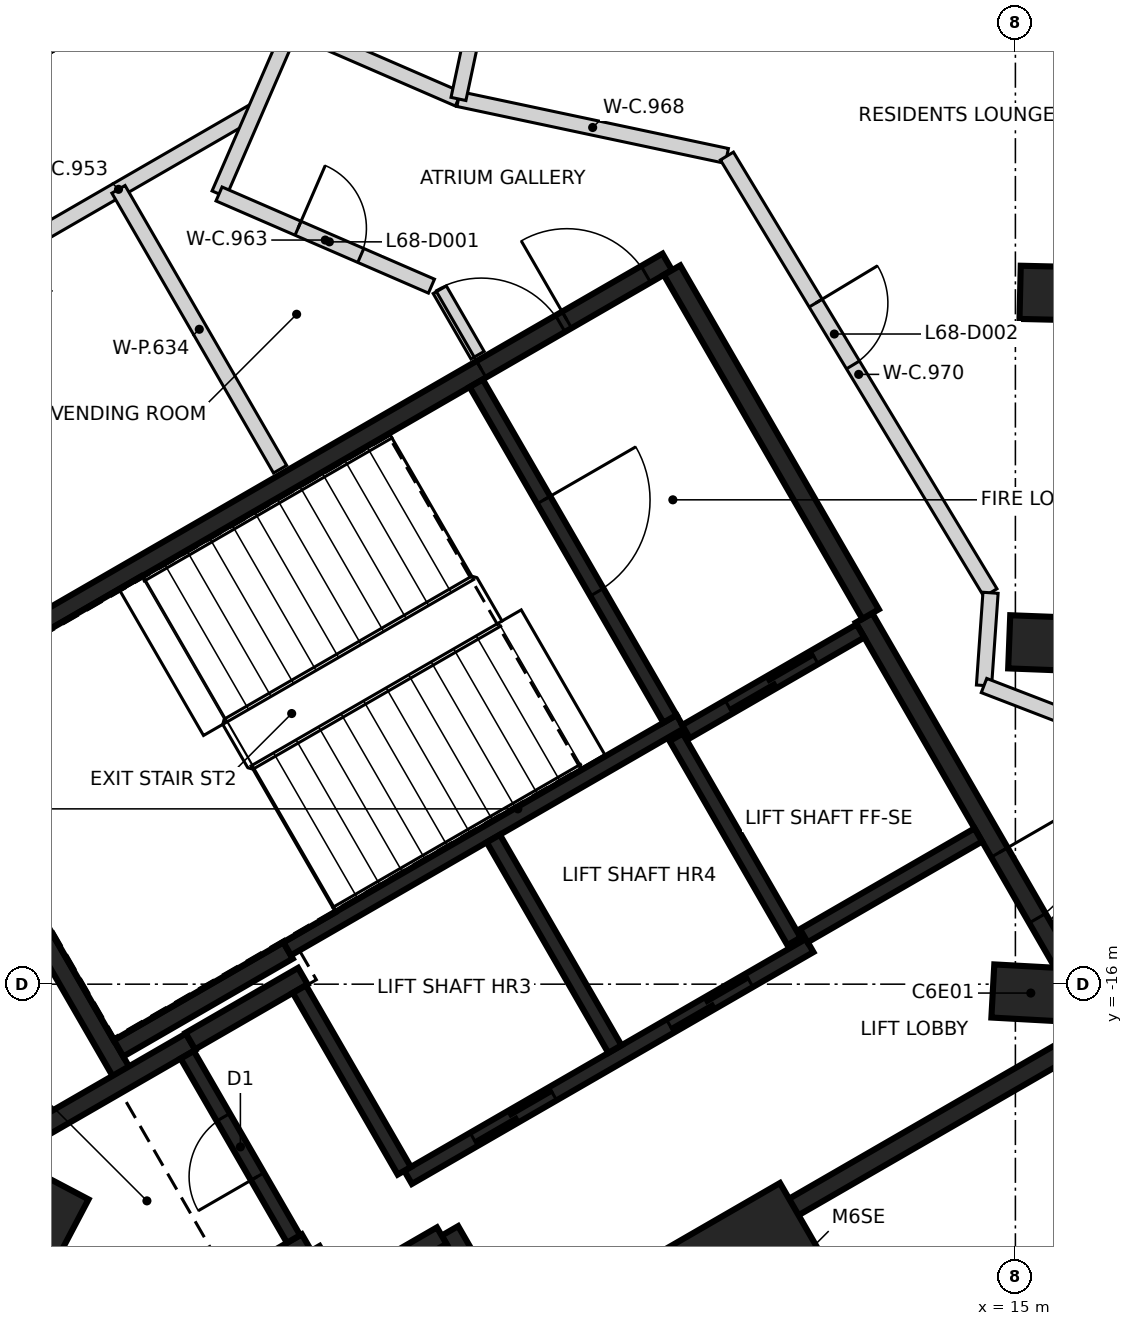
"""IFC4 building model, lengths in metres.
Left out: names, types, materials, properties, quantities, classifications, styles, units other than length and angle.
Written with IfcOpenShell. Run it as: python <this file> out.ifc"""

import sys

from ifc_helpers import new_model, si_unit, direction, frame, frame_2d, origin, origin_2d, place, context, subcontext, project, spatial, rectangle, extrude, element, fill, save


model = new_model("IFC4")
c1 = context("Model", 3, precision=1e-05, world=origin(), true_north=direction((0.0, 1.0)))
c2 = subcontext(c1, "Body", "Model", "MODEL_VIEW")
j1 = project(units=[si_unit("LENGTHUNIT", "METRE"), si_unit("PLANEANGLEUNIT", "RADIAN")], contexts=[c1])
p1 = place(None, origin())
s1 = spatial("IfcSite", under=j1, at=p1, CompositionType="ELEMENT")
p2 = place(p1, origin())
s2 = spatial("IfcBuilding", under=s1, at=p2, CompositionType="ELEMENT")
p3 = place(p2, frame((0.0, 0.0, 269.4)))
s3 = spatial("IfcBuildingStorey", under=s2, at=p3, CompositionType="ELEMENT", Elevation=269.4)
for number, where, z_axis, x_axis in (
    (1, (15.202, -16.117, -0.35), (0.0, 0.0, 1.0), (-0.998, 0.055, 0.0)),
    (2, (15.418, -11.515, -0.35), (0.0, 0.0, 1.0), (-0.999, 0.039, 0.0)),
    (3, (15.562, -6.91, -0.35), (0.0, 0.0, 1.0), (-1.0, 0.024, 0.0)),
    (4, (2.263, -19.11, -0.35), (0.0, 0.0, 1.0), (0.466, 0.885, 0.0)),
):
    element("IfcColumn", number, at=place(p3, frame(where, z_axis=z_axis, x_axis=x_axis)), inside=s3, PredefinedType="COLUMN", context=c2, shape_type="SweptSolid", body=[
        extrude(rectangle(XDim=1.0, YDim=0.7, at=origin_2d()), origin(), (0.0, 0.0, 1.0), 3.6),
    ])
p4 = place(p3, frame((11.637, -20.155, -0.35), z_axis=(0.0, 0.0, 1.0), x_axis=(-0.5, 0.866025403784, 0.0)))
e5 = element("IfcColumn", 5, at=p4, inside=s3, PredefinedType="COLUMN", context=c2, shape_type="SweptSolid", body=[
    extrude(rectangle(XDim=2.4, YDim=2.0, at=origin_2d()), origin(), (0.0, 0.0, 1.0), 3.6),
])
p5 = place(p3, frame((0.417, -12.273, 0.0), z_axis=(0.0, 0.0, 1.0), x_axis=(0.866021906294, 0.500006057782, 0.0)))
e6 = element("IfcWall", 6, at=p5, inside=s3, PredefinedType="SHEAR", context=c2, shape_type="SweptSolid", body=[
    extrude(rectangle(XDim=11.55, YDim=0.25, at=frame_2d((5.775, 0.0))), origin(), (0.0, 0.0, 1.0), 3.25),
])
p6 = place(p5, frame((10.025, 0.0, 0.0)))
e7 = element("IfcOpeningElement", 7, at=p6, cuts=e6, PredefinedType="OPENING", context=c2, shape_type="SweptSolid", body=[
    extrude(rectangle(XDim=1.2, YDim=2.1, at=frame_2d((0.6, 1.05))), frame((0.0, 0.135, 0.0), z_axis=(0.0, -1.0, 0.0), x_axis=(1.0, 0.0, 0.0)), (0.0, 0.0, 1.0), 0.27),
])
p7 = place(p5, frame((8.725, 0.0, 0.0)))
e8 = element("IfcOpeningElement", 8, at=p7, cuts=e6, PredefinedType="OPENING", context=c2, shape_type="SweptSolid", body=[
    extrude(rectangle(XDim=1.2, YDim=2.1, at=frame_2d((0.6, 1.05))), frame((0.0, 0.135, 0.0), z_axis=(0.0, -1.0, 0.0), x_axis=(1.0, 0.0, 0.0)), (0.0, 0.0, 1.0), 0.27),
])
p8 = place(p3, frame((16.133, -16.594, 0.0), z_axis=(0.0, 0.0, 1.0), x_axis=(-0.866022959057, -0.500004234368, 0.0)))
e9 = element("IfcWall", 9, at=p8, inside=s3, PredefinedType="SHEAR", context=c2, shape_type="SweptSolid", body=[
    extrude(rectangle(XDim=8.75, YDim=0.25, at=frame_2d((4.375, 0.0))), origin(), (0.0, 0.0, 1.0), 3.25),
])
p9 = place(p3, frame((13.008, -11.181, 0.0), z_axis=(0.0, 0.0, 1.0), x_axis=(0.500001955336, -0.866024274868, 0.0)))
e10 = element("IfcWall", 10, at=p9, inside=s3, PredefinedType="SHEAR", context=c2, shape_type="SweptSolid", body=[
    extrude(rectangle(XDim=6.125, YDim=0.25, at=frame_2d((3.062, 0.0))), origin(), (0.0, 0.0, 1.0), 3.25),
])
p10 = place(p9, frame((3.563, 0.0, 0.0)))
e11 = element("IfcOpeningElement", 11, at=p10, cuts=e10, PredefinedType="OPENING", context=c2, shape_type="SweptSolid", body=[
    extrude(rectangle(XDim=1.0, YDim=2.1, at=frame_2d((0.5, 1.05))), frame((0.0, 0.135, 0.0), z_axis=(0.0, -1.0, 0.0), x_axis=(1.0, 0.0, 0.0)), (0.0, 0.0, 1.0), 0.27),
])
p11 = place(p3, frame((3.235, -17.153, 0.0), z_axis=(0.0, 0.0, 1.0), x_axis=(-0.500008851346, 0.866020293397, 0.0)))
e12 = element("IfcWall", 12, at=p11, inside=s3, PredefinedType="SHEAR", context=c2, shape_type="SweptSolid", body=[
    extrude(rectangle(XDim=5.51, YDim=0.25, at=frame_2d((2.755, 0.0))), origin(), (0.0, 0.0, 1.0), 3.25),
])
p12 = place(p3, frame((10.483, -6.606, 0.0), z_axis=(0.0, 0.0, 1.0), x_axis=(0.49999885962, -0.866026062182, 0.0)))
e13 = element("IfcWall", 13, at=p12, inside=s3, PredefinedType="SHEAR", context=c2, shape_type="SweptSolid", body=[
    extrude(rectangle(XDim=5.225, YDim=0.25, at=frame_2d((2.612, 0.0))), origin(), (0.0, 0.0, 1.0), 3.25),
])
p13 = place(p3, frame((3.085, -20.894, 0.0), z_axis=(0.0, 0.0, 1.0), x_axis=(-0.499978833458, 0.866037623948, 0.0)))
e14 = element("IfcWall", 14, at=p13, inside=s3, PredefinedType="SHEAR", context=c2, shape_type="SweptSolid", body=[
    extrude(rectangle(XDim=3.05, YDim=0.25, at=frame_2d((1.525, 0.0))), origin(), (0.0, 0.0, 1.0), 3.25),
])
p14 = place(p3, frame((1.669, -18.19, 0.0), z_axis=(0.0, 0.0, 1.0), x_axis=(0.866042235819, 0.499970844928, 0.0)))
e15 = element("IfcWall", 15, at=p14, inside=s3, PredefinedType="SHEAR", context=c2, shape_type="SweptSolid", body=[
    extrude(rectangle(XDim=2.865, YDim=0.25, at=frame_2d((1.432, 0.0))), origin(), (0.0, 0.0, 1.0), 3.25),
])
p15 = place(p3, frame((5.675, -19.399, 0.0), z_axis=(0.0, 0.0, 1.0), x_axis=(-0.866026637627, -0.499997862916, 0.0)))
e16 = element("IfcWall", 16, at=p15, inside=s3, PredefinedType="SHEAR", context=c2, shape_type="SweptSolid", body=[
    extrude(rectangle(XDim=2.865, YDim=0.25, at=frame_2d((1.432, 0.0))), origin(), (0.0, 0.0, 1.0), 3.25),
])
p16 = place(p3, frame((5.431, -15.556, 0.0), z_axis=(0.0, 0.0, 1.0), x_axis=(-0.866022940537, -0.500004266446, 0.0)))
e17 = element("IfcWall", 17, at=p16, inside=s3, PredefinedType="SHEAR", context=c2, shape_type="SweptSolid", body=[
    extrude(rectangle(XDim=2.575, YDim=0.25, at=frame_2d((1.287, 0.0))), origin(), (0.0, 0.0, 1.0), 3.25),
])
p17 = place(p3, frame((8.493, -20.86, 0.0), z_axis=(0.0, 0.0, 1.0), x_axis=(-0.500039802285, 0.866002422705, 0.0)))
e18 = element("IfcWall", 18, at=p17, inside=s3, PredefinedType="SHEAR", context=c2, shape_type="SweptSolid", body=[
    extrude(rectangle(XDim=1.865, YDim=0.25, at=frame_2d((0.932, 0.0))), origin(), (0.0, 0.0, 1.0), 3.25),
])
p18 = place(p3, frame((4.145, -16.749, 0.0), z_axis=(0.0, 0.0, 1.0), x_axis=(0.866038183914, 0.499977863513, 0.0)))
e19 = element("IfcWall", 19, at=p18, inside=s3, PredefinedType="SHEAR", context=c2, shape_type="SweptSolid", body=[
    extrude(rectangle(XDim=1.71, YDim=0.25, at=frame_2d((0.855, 0.0))), origin(), (0.0, 0.0, 1.0), 3.25),
])
p19 = place(p3, frame((7.452, -19.308, 0.0), z_axis=(0.0, 0.0, 1.0), x_axis=(-0.866044474677, -0.49996696679, 0.0)))
e20 = element("IfcWall", 20, at=p19, inside=s3, PredefinedType="SHEAR", context=c2, shape_type="SweptSolid", body=[
    extrude(rectangle(XDim=1.584, YDim=0.25, at=frame_2d((0.792, 0.0))), origin(), (0.0, 0.0, 1.0), 3.25),
])
p20 = place(p3, frame((6.017, -19.992, 0.0), z_axis=(0.0, 0.0, 1.0), x_axis=(-0.500364886717, 0.865814633822, 0.0)))
e21 = element("IfcWall", 21, at=p20, inside=s3, PredefinedType="SHEAR", context=c2, shape_type="SweptSolid", body=[
    extrude(rectangle(XDim=0.559, YDim=0.25, at=frame_2d((0.28, 0.0))), origin(), (0.0, 0.0, 1.0), 3.25),
])
p21 = place(p3, frame((5.419, -15.534, 0.0), z_axis=(0.0, 0.0, 1.0), x_axis=(0.866029065029, 0.499993658486, 0.0)))
e22 = element("IfcWall", 22, at=p21, inside=s3, PredefinedType="SHEAR", context=c2, shape_type="SweptSolid", body=[
    extrude(rectangle(XDim=5.974, YDim=0.2, at=frame_2d((2.987, 0.0))), origin(), (0.0, 0.0, 1.0), 3.25),
])
p22 = place(p3, frame((7.01, -18.542, 0.0), z_axis=(0.0, 0.0, 1.0), x_axis=(0.866030299012, 0.499991521122, 0.0)))
e23 = element("IfcWall", 23, at=p22, inside=s3, PredefinedType="SHEAR", context=c2, shape_type="SweptSolid", body=[
    extrude(rectangle(XDim=6.1, YDim=0.2, at=frame_2d((3.05, 0.0))), origin(), (0.0, 0.0, 1.0), 3.25),
])
p23 = place(p22, frame((1.0, 0.0, 0.0)))
e24 = element("IfcOpeningElement", 24, at=p23, cuts=e23, PredefinedType="OPENING", context=c2, shape_type="SweptSolid", body=[
    extrude(rectangle(XDim=1.2, YDim=2.1, at=frame_2d((0.6, 1.05))), frame((0.0, 0.11, 0.0), z_axis=(0.0, -1.0, 0.0), x_axis=(1.0, 0.0, 0.0)), (0.0, 0.0, 1.0), 0.22),
])
p24 = place(p22, frame((3.982, 0.0, 0.0)))
e25 = element("IfcOpeningElement", 25, at=p24, cuts=e23, PredefinedType="OPENING", context=c2, shape_type="SweptSolid", body=[
    extrude(rectangle(XDim=1.2, YDim=2.1, at=frame_2d((0.6, 1.05))), frame((0.0, 0.11, 0.0), z_axis=(0.0, -1.0, 0.0), x_axis=(1.0, 0.0, 0.0)), (0.0, 0.0, 1.0), 0.22),
])
p25 = place(p3, frame((7.906, -8.094, 0.0), z_axis=(0.0, 0.0, 1.0), x_axis=(0.500027839223, -0.866009330205, 0.0)))
e26 = element("IfcWall", 26, at=p25, inside=s3, PredefinedType="SHEAR", context=c2, shape_type="SweptSolid", body=[
    extrude(rectangle(XDim=5.098, YDim=0.2, at=frame_2d((2.549, 0.0))), origin(), (0.0, 0.0, 1.0), 3.25),
])
p26 = place(p25, frame((1.774, 0.0, 0.0)))
e27 = element("IfcOpeningElement", 27, at=p26, cuts=e26, PredefinedType="OPENING", context=c2, shape_type="SweptSolid", body=[
    extrude(rectangle(XDim=1.4, YDim=2.1, at=frame_2d((0.7, 1.05))), frame((0.0, 0.11, 0.0), z_axis=(0.0, -1.0, 0.0), x_axis=(1.0, 0.0, 0.0)), (0.0, 0.0, 1.0), 0.22),
])
p27 = place(p3, frame((8.132, -14.084, 0.0), z_axis=(0.0, 0.0, 1.0), x_axis=(0.499997778408, -0.866026686418, 0.0)))
e28 = element("IfcWall", 28, at=p27, inside=s3, PredefinedType="SHEAR", context=c2, shape_type="SweptSolid", body=[
    extrude(rectangle(XDim=3.198, YDim=0.2, at=frame_2d((1.599, 0.0))), origin(), (0.0, 0.0, 1.0), 3.25),
])
p28 = place(p3, frame((5.503, -19.352, 0.0), z_axis=(0.0, 0.0, 1.0), x_axis=(-0.499986818241, 0.866033014143, 0.0)))
e29 = element("IfcWall", 29, at=p28, inside=s3, PredefinedType="SHEAR", context=c2, shape_type="SweptSolid", body=[
    extrude(rectangle(XDim=2.798, YDim=0.2, at=frame_2d((1.399, 0.0))), origin(), (0.0, 0.0, 1.0), 3.25),
])
p29 = place(p28, frame((0.949, 0.0, 0.0)))
e30 = element("IfcOpeningElement", 30, at=p29, cuts=e29, PredefinedType="OPENING", context=c2, shape_type="SweptSolid", body=[
    extrude(rectangle(XDim=0.9, YDim=2.1, at=frame_2d((0.45, 1.05))), frame((0.0, 0.11, 0.0), z_axis=(0.0, -1.0, 0.0), x_axis=(1.0, 0.0, 0.0)), (0.0, 0.0, 1.0), 0.22),
])
p30 = place(p3, frame((6.96, -18.455, 0.0), z_axis=(0.0, 0.0, 1.0), x_axis=(-0.499926705758, 0.866067716099, 0.0)))
e31 = element("IfcWall", 31, at=p30, inside=s3, PredefinedType="SHEAR", context=c2, shape_type="SweptSolid", body=[
    extrude(rectangle(XDim=2.759, YDim=0.2, at=frame_2d((1.38, 0.0))), origin(), (0.0, 0.0, 1.0), 3.25),
])
p31 = place(p3, frame((12.088, -15.437, 0.0), z_axis=(0.0, 0.0, 1.0), x_axis=(-0.500026960575, 0.86600983753, 0.0)))
e32 = element("IfcWall", 32, at=p31, inside=s3, PredefinedType="SHEAR", context=c2, shape_type="SweptSolid", body=[
    extrude(rectangle(XDim=3.1, YDim=0.2, at=frame_2d((1.55, 0.0))), origin(), (0.0, 0.0, 1.0), 3.25),
])
p32 = place(p3, frame((10.666, -12.678, 0.0), z_axis=(0.0, 0.0, 1.0), x_axis=(0.866018407898, 0.500012117035, 0.0)))
e33 = element("IfcWall", 33, at=p32, inside=s3, PredefinedType="SHEAR", context=c2, shape_type="SweptSolid", body=[
    extrude(rectangle(XDim=2.651, YDim=0.2, at=frame_2d((1.325, 0.0))), origin(), (0.0, 0.0, 1.0), 3.25),
])
p33 = place(p32, frame((0.652, 0.0, 0.0)))
e34 = element("IfcOpeningElement", 34, at=p33, cuts=e33, PredefinedType="OPENING", context=c2, shape_type="SweptSolid", body=[
    extrude(rectangle(XDim=1.3, YDim=2.1, at=frame_2d((0.65, 1.05))), frame((0.0, 0.11, 0.0), z_axis=(0.0, -1.0, 0.0), x_axis=(1.0, 0.0, 0.0)), (0.0, 0.0, 1.0), 0.22),
])
p34 = place(p3, frame((14.512, -14.037, 0.0), z_axis=(0.0, 0.0, 1.0), x_axis=(-0.866018407898, -0.500012117035, 0.0)))
e35 = element("IfcWall", 35, at=p34, inside=s3, PredefinedType="SHEAR", context=c2, shape_type="SweptSolid", body=[
    extrude(rectangle(XDim=2.651, YDim=0.2, at=frame_2d((1.325, 0.0))), origin(), (0.0, 0.0, 1.0), 3.25),
])
p35 = place(p3, frame((1.401, -6.583, 0.0), z_axis=(0.0, 0.0, 1.0), x_axis=(0.865818713766, 0.500357826853, 0.0)))
e36 = element("IfcWall", 36, at=p35, inside=s3, PredefinedType="PARTITIONING", context=c2, shape_type="SweptSolid", body=[
    extrude(rectangle(XDim=4.157, YDim=0.2, at=frame_2d((2.079, 0.0))), origin(), (0.0, 0.0, 1.0), 3.25),
])
p36 = place(p3, frame((4.523, -5.604, 0.0), z_axis=(0.0, 0.0, 1.0), x_axis=(0.398033282066, 0.917370975324, 0.0)))
e37 = element("IfcWall", 37, at=p36, inside=s3, PredefinedType="PARTITIONING", context=c2, shape_type="SweptSolid", body=[
    extrude(rectangle(XDim=2.397, YDim=0.2, at=frame_2d((1.198, 0.0))), origin(), (0.0, 0.0, 1.0), 3.25),
])
p37 = place(p3, frame((4.523, -5.604, 0.0), z_axis=(0.0, 0.0, 1.0), x_axis=(0.917390838441, -0.397987499231, 0.0)))
e38 = element("IfcWall", 38, at=p37, inside=s3, PredefinedType="PARTITIONING", context=c2, shape_type="SweptSolid", body=[
    extrude(rectangle(XDim=3.046, YDim=0.2, at=frame_2d((1.523, 0.0))), origin(), (0.0, 0.0, 1.0), 3.25),
])
p38 = place(p37, frame((1.133, 0.0, 0.0)))
e39 = element("IfcOpeningElement", 39, at=p38, cuts=e38, PredefinedType="OPENING", context=c2, shape_type="SweptSolid", body=[
    extrude(rectangle(XDim=0.9, YDim=2.1, at=frame_2d((0.45, 1.05))), frame((0.0, 0.11, 0.0), z_axis=(0.0, -1.0, 0.0), x_axis=(1.0, 0.0, 0.0)), (0.0, 0.0, 1.0), 0.22),
])
p39 = place(p3, frame((5.48, -3.404, 0.0), z_axis=(0.0, 0.0, 1.0), x_axis=(0.917402729571, -0.39796008817, 0.0)))
e40 = element("IfcWall", 40, at=p39, inside=s3, PredefinedType="PARTITIONING", context=c2, shape_type="SweptSolid", body=[
    extrude(rectangle(XDim=2.389, YDim=0.2, at=frame_2d((1.195, 0.0))), origin(), (0.0, 0.0, 1.0), 3.25),
])
p40 = place(p3, frame((7.427, -6.864, 0.0), z_axis=(0.0, 0.0, 1.0), x_axis=(0.499942098031, -0.866058830921, 0.0)))
e41 = element("IfcWall", 41, at=p40, inside=s3, PredefinedType="PARTITIONING", context=c2, shape_type="SweptSolid", body=[
    extrude(rectangle(XDim=0.994, YDim=0.2, at=frame_2d((0.497, 0.0))), origin(), (0.0, 0.0, 1.0), 3.25),
])
p41 = place(p3, frame((7.673, -4.355, 0.0), z_axis=(0.0, 0.0, 1.0), x_axis=(0.978232876952, -0.207510092407, 0.0)))
e42 = element("IfcWall", 42, at=p41, inside=s3, PredefinedType="PARTITIONING", context=c2, shape_type="SweptSolid", body=[
    extrude(rectangle(XDim=3.61, YDim=0.2, at=frame_2d((1.805, 0.0))), origin(), (0.0, 0.0, 1.0), 3.25),
])
p42 = place(p3, frame((7.673, -4.354, 0.0), z_axis=(0.0, 0.0, 1.0), x_axis=(0.207939957157, 0.978141592111, 0.0)))
e43 = element("IfcWall", 43, at=p42, inside=s3, PredefinedType="PARTITIONING", context=c2, shape_type="SweptSolid", body=[
    extrude(rectangle(XDim=2.697, YDim=0.2, at=frame_2d((1.348, 0.0))), origin(), (0.0, 0.0, 1.0), 3.25),
])
p43 = place(p3, frame((11.205, -5.105, 0.0), z_axis=(0.0, 0.0, 1.0), x_axis=(0.516682442017, -0.856177116087, 0.0)))
e44 = element("IfcWall", 44, at=p43, inside=s3, PredefinedType="PARTITIONING", context=c2, shape_type="SweptSolid", body=[
    extrude(rectangle(XDim=6.71, YDim=0.2, at=frame_2d((3.355, 0.0))), origin(), (0.0, 0.0, 1.0), 3.25),
])
p44 = place(p43, frame((2.26, 0.0, 0.0)))
e45 = element("IfcOpeningElement", 45, at=p44, cuts=e44, PredefinedType="OPENING", context=c2, shape_type="SweptSolid", body=[
    extrude(rectangle(XDim=0.95, YDim=2.1, at=frame_2d((0.475, 1.05))), frame((0.0, 0.11, 0.0), z_axis=(0.0, -1.0, 0.0), x_axis=(1.0, 0.0, 0.0)), (0.0, 0.0, 1.0), 0.22),
])
p45 = place(p3, frame((14.587, -12.071, 0.0), z_axis=(0.0, 0.0, 1.0), x_axis=(0.070466777423, 0.997514126857, 0.0)))
e46 = element("IfcWall", 46, at=p45, inside=s3, PredefinedType="PARTITIONING", context=c2, shape_type="SweptSolid", body=[
    extrude(rectangle(XDim=1.223, YDim=0.2, at=frame_2d((0.611, 0.0))), origin(), (0.0, 0.0, 1.0), 3.25),
])
p46 = place(p3, frame((14.587, -12.071, 0.0), z_axis=(0.0, 0.0, 1.0), x_axis=(0.933192153307, -0.359377802606, 0.0)))
e47 = element("IfcWall", 47, at=p46, inside=s3, PredefinedType="PARTITIONING", context=c2, shape_type="SweptSolid", body=[
    extrude(rectangle(XDim=1.149, YDim=0.2, at=frame_2d((0.574, 0.0))), origin(), (0.0, 0.0, 1.0), 2.35),
])
p47 = place(p3, frame((15.55, -15.213, 0.0), z_axis=(0.0, 0.0, 1.0), x_axis=(0.865989998118, 0.500061319399, 0.0)))
e48 = element("IfcWall", 48, at=p47, inside=s3, PredefinedType="PARTITIONING", context=c2, shape_type="SweptSolid", body=[
    extrude(rectangle(XDim=0.79, YDim=0.2, at=frame_2d((0.395, 0.0))), origin(), (0.0, 0.0, 1.0), 3.25),
])
p48 = place(p3, frame((3.2, -5.543, 0.0), z_axis=(0.0, 0.0, 1.0), x_axis=(0.500060428066, -0.865990512813, 0.0)))
e49 = element("IfcWall", 49, at=p48, inside=s3, PredefinedType="PARTITIONING", context=c2, shape_type="SweptSolid", body=[
    extrude(rectangle(XDim=4.252, YDim=0.2, at=frame_2d((2.126, 0.0))), origin(), (0.0, 0.0, 1.0), 3.25),
])
p49 = place(p33, origin())
e50 = element("IfcDoor", 50, at=p49, inside=s3, OperationType="SLIDING_TO_RIGHT", PredefinedType="DOOR", context=c2, shape_type="SweptSolid", body=[
    extrude(rectangle(XDim=1.3, YDim=2.1, at=frame_2d((0.65, 1.05))), frame((0.0, 0.025, 0.0), z_axis=(0.0, -1.0, 0.0), x_axis=(1.0, 0.0, 0.0)), (0.0, 0.0, 1.0), 0.05),
])
fill(e34, e50)
p50 = place(p23, origin())
e51 = element("IfcDoor", 51, at=p50, inside=s3, OperationType="DOUBLE_DOOR_SLIDING", PredefinedType="DOOR", context=c2, shape_type="SweptSolid", body=[
    extrude(rectangle(XDim=1.2, YDim=2.1, at=frame_2d((0.6, 1.05))), frame((0.0, 0.025, 0.0), z_axis=(0.0, -1.0, 0.0), x_axis=(1.0, 0.0, 0.0)), (0.0, 0.0, 1.0), 0.05),
])
fill(e24, e51)
p51 = place(p24, origin())
e52 = element("IfcDoor", 52, at=p51, inside=s3, OperationType="DOUBLE_DOOR_SLIDING", PredefinedType="DOOR", context=c2, shape_type="SweptSolid", body=[
    extrude(rectangle(XDim=1.2, YDim=2.1, at=frame_2d((0.6, 1.05))), frame((0.0, 0.025, 0.0), z_axis=(0.0, -1.0, 0.0), x_axis=(1.0, 0.0, 0.0)), (0.0, 0.0, 1.0), 0.05),
])
fill(e25, e52)
p52 = place(p10, origin())
e53 = element("IfcDoor", 53, at=p52, inside=s3, OperationType="SINGLE_SWING_LEFT", PredefinedType="DOOR", context=c2, shape_type="SweptSolid", body=[
    extrude(rectangle(XDim=1.0, YDim=2.1, at=frame_2d((0.5, 1.05))), frame((0.0, 0.025, 0.0), z_axis=(0.0, -1.0, 0.0), x_axis=(1.0, 0.0, 0.0)), (0.0, 0.0, 1.0), 0.05),
])
fill(e11, e53)
p53 = place(p6, origin())
e54 = element("IfcDoor", 54, at=p53, inside=s3, OperationType="SINGLE_SWING_LEFT", PredefinedType="DOOR", context=c2, shape_type="SweptSolid", body=[
    extrude(rectangle(XDim=1.2, YDim=2.1, at=frame_2d((0.6, 1.05))), frame((0.0, 0.025, 0.0), z_axis=(0.0, -1.0, 0.0), x_axis=(1.0, 0.0, 0.0)), (0.0, 0.0, 1.0), 0.05),
])
fill(e7, e54)
p54 = place(p7, origin())
e55 = element("IfcDoor", 55, at=p54, inside=s3, OperationType="SINGLE_SWING_RIGHT", PredefinedType="DOOR", context=c2, shape_type="SweptSolid", body=[
    extrude(rectangle(XDim=1.2, YDim=2.1, at=frame_2d((0.6, 1.05))), frame((0.0, 0.025, 0.0), z_axis=(0.0, -1.0, 0.0), x_axis=(1.0, 0.0, 0.0)), (0.0, 0.0, 1.0), 0.05),
])
fill(e8, e55)
p55 = place(p26, origin())
e56 = element("IfcDoor", 56, at=p55, inside=s3, OperationType="SINGLE_SWING_RIGHT", PredefinedType="DOOR", context=c2, shape_type="SweptSolid", body=[
    extrude(rectangle(XDim=1.4, YDim=2.1, at=frame_2d((0.7, 1.05))), frame((0.0, 0.025, 0.0), z_axis=(0.0, -1.0, 0.0), x_axis=(1.0, 0.0, 0.0)), (0.0, 0.0, 1.0), 0.05),
])
fill(e27, e56)
p56 = place(p29, origin())
e57 = element("IfcDoor", 57, at=p56, inside=s3, OperationType="SINGLE_SWING_LEFT", PredefinedType="DOOR", context=c2, shape_type="SweptSolid", body=[
    extrude(rectangle(XDim=0.9, YDim=2.1, at=frame_2d((0.45, 1.05))), frame((0.0, 0.025, 0.0), z_axis=(0.0, -1.0, 0.0), x_axis=(1.0, 0.0, 0.0)), (0.0, 0.0, 1.0), 0.05),
])
fill(e30, e57)
p57 = place(p38, frame((0.9, 0.0, 0.0), z_axis=(0.0, 0.0, 1.0), x_axis=(-1.0, 0.0, 0.0)))
e58 = element("IfcDoor", 58, at=p57, inside=s3, OperationType="SINGLE_SWING_LEFT", PredefinedType="DOOR", context=c2, shape_type="SweptSolid", body=[
    extrude(rectangle(XDim=0.9, YDim=2.1, at=frame_2d((0.45, 1.05))), frame((0.0, 0.025, 0.0), z_axis=(0.0, -1.0, 0.0), x_axis=(1.0, 0.0, 0.0)), (0.0, 0.0, 1.0), 0.05),
])
fill(e39, e58)
p58 = place(p44, origin())
e59 = element("IfcDoor", 59, at=p58, inside=s3, OperationType="SINGLE_SWING_LEFT", PredefinedType="DOOR", context=c2, shape_type="SweptSolid", body=[
    extrude(rectangle(XDim=0.95, YDim=2.1, at=frame_2d((0.475, 1.05))), frame((0.0, 0.025, 0.0), z_axis=(0.0, -1.0, 0.0), x_axis=(1.0, 0.0, 0.0)), (0.0, 0.0, 1.0), 0.05),
])
fill(e45, e59)
save(model, sys.argv[1])
